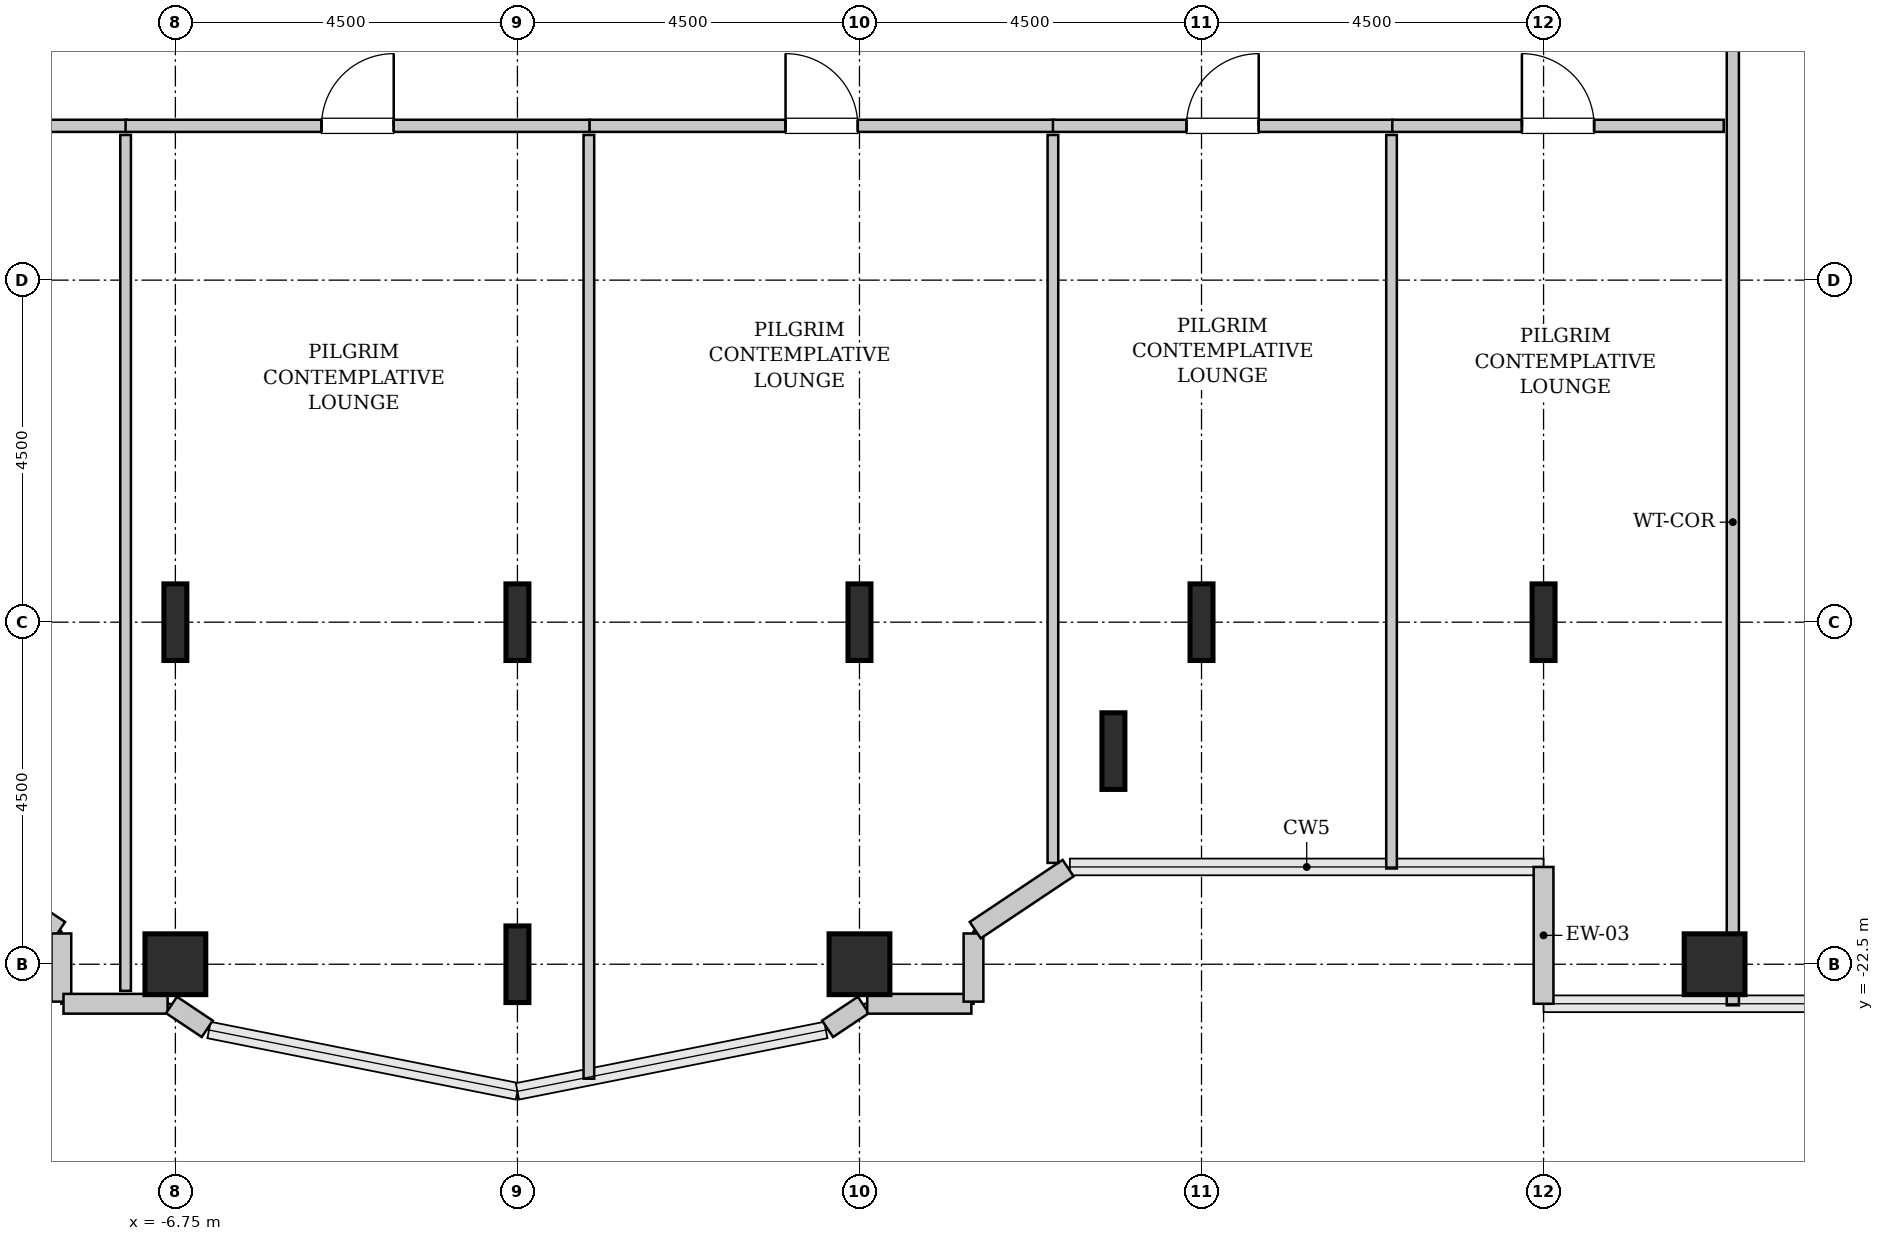
"""IFC4 building model, lengths in metres.
Left out: names, types, materials, properties, quantities, classifications, styles, units other than length and angle.
Written with IfcOpenShell. Run it as: python <this file> out.ifc"""

import sys

from ifc_helpers import new_model, si_unit, direction, frame, frame_2d, origin, origin_2d, place, context, subcontext, project, spatial, rectangle, hollow_rectangle, i_section, extrude, source, transform, mapped, element, fill, save


model = new_model("IFC4")
c1 = context("Model", 3, precision=1e-05, world=origin(), true_north=direction((0.0, 1.0)))
c2 = subcontext(c1, "Body", "Model", "MODEL_VIEW")
j1 = project(units=[si_unit("LENGTHUNIT", "METRE"), si_unit("PLANEANGLEUNIT", "RADIAN")], contexts=[c1])
p1 = place(None, origin())
s1 = spatial("IfcSite", under=j1, at=p1, CompositionType="ELEMENT")
p2 = place(p1, origin())
s2 = spatial("IfcBuilding", under=s1, at=p2, CompositionType="ELEMENT")
p3 = place(p2, frame((0.0, 0.0, 128.8)))
s3 = spatial("IfcBuildingStorey", under=s2, at=p3, CompositionType="ELEMENT", Elevation=128.8)
m1 = source(origin(), c2, "Body", "SweptSolid", [
    extrude(hollow_rectangle(XDim=0.8, YDim=0.8, WallThickness=0.04, InnerFilletRadius=0.04, OuterFilletRadius=0.08, at=origin_2d()), origin(), (0.0, 0.0, 1.0), 3.8),
])
p4 = place(p3, frame((-6.75, -22.5, 0.0), z_axis=(0.0, 0.0, 1.0), x_axis=(1.0, 0.0, 0.0)))
e1 = element("IfcColumn", 1, at=p4, inside=s3, PredefinedType="COLUMN", context=c2, shape_type="MappedRepresentation", body=[
    mapped(m1, transform((0.0, 0.0, 0.0), x_axis=(1.0, 0.0, 0.0), y_axis=(0.0, 1.0, 0.0), z_axis=(0.0, 0.0, 1.0), scale=1.0)),
])
m2 = source(origin(), c2, "Body", "SweptSolid", [
    extrude(i_section(OverallWidth=0.302, OverallDepth=1.008, WebThickness=0.021, FlangeThickness=0.04, FilletRadius=0.03, at=origin_2d()), origin(), (0.0, 0.0, 1.0), 3.8),
])
for number, where, z_axis, x_axis in (
    (2, (-6.75, -18.0, 0.0), (0.0, 0.0, 1.0), (1.0, 0.0, 0.0)),
    (3, (-2.25, -22.5, 0.0), (0.0, 0.0, 1.0), (1.0, 0.0, 0.0)),
    (4, (-2.25, -18.0, 0.0), (0.0, 0.0, 1.0), (1.0, 0.0, 0.0)),
):
    element("IfcColumn", number, at=place(p3, frame(where, z_axis=z_axis, x_axis=x_axis)), inside=s3, PredefinedType="COLUMN", context=c2, shape_type="MappedRepresentation", body=[
        mapped(m2, transform((0.0, 0.0, 0.0), x_axis=(1.0, 0.0, 0.0), y_axis=(0.0, 1.0, 0.0), z_axis=(0.0, 0.0, 1.0), scale=1.0)),
    ])
p5 = place(p3, frame((2.25, -22.5, 0.0), z_axis=(0.0, 0.0, 1.0), x_axis=(1.0, 0.0, 0.0)))
e5 = element("IfcColumn", 5, at=p5, inside=s3, PredefinedType="COLUMN", context=c2, shape_type="MappedRepresentation", body=[
    mapped(m1, transform((0.0, 0.0, 0.0), x_axis=(1.0, 0.0, 0.0), y_axis=(0.0, 1.0, 0.0), z_axis=(0.0, 0.0, 1.0), scale=1.0)),
])
for number, where, z_axis, x_axis in (
    (6, (2.25, -18.0, 0.0), (0.0, 0.0, 1.0), (1.0, 0.0, 0.0)),
    (7, (5.591, -19.696, 0.0), (0.0, 0.0, 1.0), (1.0, 0.0, 0.0)),
    (8, (6.75, -18.0, 0.0), (0.0, 0.0, 1.0), (1.0, 0.0, 0.0)),
    (9, (11.25, -18.0, 0.0), (0.0, 0.0, 1.0), (1.0, 0.0, 0.0)),
):
    element("IfcColumn", number, at=place(p3, frame(where, z_axis=z_axis, x_axis=x_axis)), inside=s3, PredefinedType="COLUMN", context=c2, shape_type="MappedRepresentation", body=[
        mapped(m2, transform((0.0, 0.0, 0.0), x_axis=(1.0, 0.0, 0.0), y_axis=(0.0, 1.0, 0.0), z_axis=(0.0, 0.0, 1.0), scale=1.0)),
    ])
p6 = place(p3, frame((13.5, -22.5, 0.0), z_axis=(0.0, 0.0, 1.0), x_axis=(1.0, 0.0, 0.0)))
e10 = element("IfcColumn", 10, at=p6, inside=s3, PredefinedType="COLUMN", context=c2, shape_type="MappedRepresentation", body=[
    mapped(m1, transform((0.0, 0.0, 0.0), x_axis=(1.0, 0.0, 0.0), y_axis=(0.0, 1.0, 0.0), z_axis=(0.0, 0.0, 1.0), scale=1.0)),
])
m3 = source(origin(), c2, "Body", "SweptSolid", [
    extrude(rectangle(XDim=1.8, YDim=0.26, at=frame_2d((0.9, 0.0))), origin(), (0.0, 0.0, 1.0), 3.55),
])
p7 = place(p3, frame((11.25, -21.22, 0.0), z_axis=(0.0, 0.0, 1.0), x_axis=(0.0, -1.0, 0.0)))
e11 = element("IfcWall", 11, at=p7, inside=s3, PredefinedType="SOLIDWALL", context=c2, shape_type="MappedRepresentation", body=[
    mapped(m3, transform((0.0, 0.0, 0.0), x_axis=(1.0, 0.0, 0.0), y_axis=(0.0, 1.0, 0.0), z_axis=(0.0, 0.0, 1.0), scale=1.0)),
])
m4 = source(origin(), c2, "Body", "SweptSolid", [
    extrude(rectangle(XDim=1.469, YDim=0.26, at=frame_2d((0.734, 0.0))), origin(), (0.0, 0.0, 1.0), 3.55),
])
p8 = place(p3, frame((-9.495, -21.236, 0.0), z_axis=(0.0, 0.0, 1.0), x_axis=(0.831461760506, -0.555581983884, 0.0)))
e12 = element("IfcWall", 12, at=p8, inside=s3, PredefinedType="SOLIDWALL", context=c2, shape_type="MappedRepresentation", body=[
    mapped(m4, transform((0.0, 0.0, 0.0), x_axis=(1.0, 0.0, 0.0), y_axis=(0.0, 1.0, 0.0), z_axis=(0.0, 0.0, 1.0), scale=1.0)),
])
m5 = source(origin(), c2, "Body", "SweptSolid", [
    extrude(rectangle(XDim=0.897, YDim=0.26, at=frame_2d((0.448, 0.0))), origin(), (0.0, 0.0, 1.0), 3.55),
])
p9 = place(p3, frame((-8.25, -22.095, 0.0), z_axis=(0.0, 0.0, 1.0), x_axis=(0.0, -1.0, 0.0)))
e13 = element("IfcWall", 13, at=p9, inside=s3, PredefinedType="SOLIDWALL", context=c2, shape_type="MappedRepresentation", body=[
    mapped(m5, transform((0.0, 0.0, 0.0), x_axis=(1.0, 0.0, 0.0), y_axis=(0.0, 1.0, 0.0), z_axis=(0.0, 0.0, 1.0), scale=1.0)),
])
m6 = source(origin(), c2, "Body", "SweptSolid", [
    extrude(rectangle(XDim=1.37, YDim=0.26, at=frame_2d((0.685, 0.0))), origin(), (0.0, 0.0, 1.0), 3.55),
])
p10 = place(p3, frame((-8.222, -23.02, 0.0), z_axis=(0.0, 0.0, 1.0), x_axis=(1.0, 0.0, 0.0)))
e14 = element("IfcWall", 14, at=p10, inside=s3, PredefinedType="SOLIDWALL", context=c2, shape_type="MappedRepresentation", body=[
    mapped(m6, transform((0.0, 0.0, 0.0), x_axis=(1.0, 0.0, 0.0), y_axis=(0.0, 1.0, 0.0), z_axis=(0.0, 0.0, 1.0), scale=1.0)),
])
m7 = source(origin(), c2, "Body", "SweptSolid", [
    extrude(rectangle(XDim=0.565, YDim=0.26, at=frame_2d((0.283, 0.0))), origin(), (0.0, 0.0, 1.0), 3.55),
])
for number, where, z_axis, x_axis in (
    (15, (-6.801, -23.036, 0.0), (0.0, 0.0, 1.0), (0.832, -0.555, 0.0)),
    (16, (1.831, -23.35, 0.0), (0.0, 0.0, 1.0), (0.832, 0.555, 0.0)),
):
    element("IfcWall", number, at=place(p3, frame(where, z_axis=z_axis, x_axis=x_axis)), inside=s3, PredefinedType="SOLIDWALL", context=c2, shape_type="MappedRepresentation", body=[
        mapped(m7, transform((0.0, 0.0, 0.0), x_axis=(1.0, 0.0, 0.0), y_axis=(0.0, 1.0, 0.0), z_axis=(0.0, 0.0, 1.0), scale=1.0)),
    ])
p11 = place(p3, frame((2.352, -23.02, 0.0), z_axis=(0.0, 0.0, 1.0), x_axis=(1.0, 0.0, 0.0)))
e17 = element("IfcWall", 17, at=p11, inside=s3, PredefinedType="SOLIDWALL", context=c2, shape_type="MappedRepresentation", body=[
    mapped(m6, transform((0.0, 0.0, 0.0), x_axis=(1.0, 0.0, 0.0), y_axis=(0.0, 1.0, 0.0), z_axis=(0.0, 0.0, 1.0), scale=1.0)),
])
p12 = place(p3, frame((3.75, -22.992, 0.0), z_axis=(0.0, 0.0, 1.0), x_axis=(0.0, 1.0, 0.0)))
e18 = element("IfcWall", 18, at=p12, inside=s3, PredefinedType="SOLIDWALL", context=c2, shape_type="MappedRepresentation", body=[
    mapped(m5, transform((0.0, 0.0, 0.0), x_axis=(1.0, 0.0, 0.0), y_axis=(0.0, 1.0, 0.0), z_axis=(0.0, 0.0, 1.0), scale=1.0)),
])
p13 = place(p3, frame((3.773, -22.052, 0.0), z_axis=(0.0, 0.0, 1.0), x_axis=(0.831461760506, 0.555581983884, 0.0)))
e19 = element("IfcWall", 19, at=p13, inside=s3, PredefinedType="SOLIDWALL", context=c2, shape_type="MappedRepresentation", body=[
    mapped(m4, transform((0.0, 0.0, 0.0), x_axis=(1.0, 0.0, 0.0), y_axis=(0.0, 1.0, 0.0), z_axis=(0.0, 0.0, 1.0), scale=1.0)),
])
m8 = source(origin(), c2, "Body", "SweptSolid", [
    extrude(rectangle(XDim=14.745, YDim=0.16, at=frame_2d((7.373, 0.0))), origin(), (0.0, 0.0, 1.0), 3.535),
])
p14 = place(p3, frame((13.74, -23.04, 0.0), z_axis=(0.0, 0.0, 1.0), x_axis=(0.0, 1.0, 0.0)))
e20 = element("IfcWall", 20, at=p14, inside=s3, PredefinedType="PARTITIONING", context=c2, shape_type="MappedRepresentation", body=[
    mapped(m8, transform((0.0, 0.0, 0.0), x_axis=(1.0, 0.0, 0.0), y_axis=(0.0, 1.0, 0.0), z_axis=(0.0, 0.0, 1.0), scale=1.0)),
])
p15 = place(p14, frame((12.663, 0.0, 0.0)))
e21 = element("IfcOpeningElement", 21, at=p15, cuts=e20, PredefinedType="OPENING", context=c2, shape_type="SweptSolid", body=[
    extrude(rectangle(XDim=0.95, YDim=2.1, at=frame_2d((0.475, 1.05))), frame((0.0, 0.09, 0.0), z_axis=(0.0, -1.0, 0.0), x_axis=(1.0, 0.0, 0.0)), (0.0, 0.0, 1.0), 0.18),
])
m9 = source(origin(), c2, "Body", "SweptSolid", [
    extrude(rectangle(XDim=6.225, YDim=0.16, at=frame_2d((3.113, 0.0))), origin(), (0.0, 0.0, 1.0), 3.535),
])
p16 = place(p3, frame((-13.62, -11.47, 0.0), z_axis=(0.0, 0.0, 1.0), x_axis=(1.0, 0.0, 0.0)))
e22 = element("IfcWall", 22, at=p16, inside=s3, PredefinedType="PARTITIONING", context=c2, shape_type="MappedRepresentation", body=[
    mapped(m9, transform((0.0, 0.0, 0.0), x_axis=(1.0, 0.0, 0.0), y_axis=(0.0, 1.0, 0.0), z_axis=(0.0, 0.0, 1.0), scale=1.0)),
])
p17 = place(p16, frame((2.637, 0.0, 0.0)))
e23 = element("IfcOpeningElement", 23, at=p17, cuts=e22, PredefinedType="OPENING", context=c2, shape_type="SweptSolid", body=[
    extrude(rectangle(XDim=0.95, YDim=2.1, at=frame_2d((0.475, 1.05))), frame((0.0, 0.09, 0.0), z_axis=(0.0, -1.0, 0.0), x_axis=(1.0, 0.0, 0.0)), (0.0, 0.0, 1.0), 0.18),
])
m10 = source(origin(), c2, "Body", "SweptSolid", [
    extrude(rectangle(XDim=11.26, YDim=0.14, at=frame_2d((5.63, 0.0))), origin(), (0.0, 0.0, 1.0), 3.535),
])
p18 = place(p3, frame((-7.405, -22.85, 0.0), z_axis=(0.0, 0.0, 1.0), x_axis=(0.0, 1.0, 0.0)))
e24 = element("IfcWall", 24, at=p18, inside=s3, PredefinedType="PARTITIONING", context=c2, shape_type="MappedRepresentation", body=[
    mapped(m10, transform((0.0, 0.0, 0.0), x_axis=(1.0, 0.0, 0.0), y_axis=(0.0, 1.0, 0.0), z_axis=(0.0, 0.0, 1.0), scale=1.0)),
])
m11 = source(origin(), c2, "Body", "SweptSolid", [
    extrude(rectangle(XDim=6.105, YDim=0.16, at=frame_2d((3.052, 0.0))), origin(), (0.0, 0.0, 1.0), 3.535),
])
p19 = place(p3, frame((-7.405, -11.47, 0.0), z_axis=(0.0, 0.0, 1.0), x_axis=(1.0, 0.0, 0.0)))
e25 = element("IfcWall", 25, at=p19, inside=s3, PredefinedType="PARTITIONING", context=c2, shape_type="MappedRepresentation", body=[
    mapped(m11, transform((0.0, 0.0, 0.0), x_axis=(1.0, 0.0, 0.0), y_axis=(0.0, 1.0, 0.0), z_axis=(0.0, 0.0, 1.0), scale=1.0)),
])
p20 = place(p19, frame((2.577, 0.0, 0.0)))
e26 = element("IfcOpeningElement", 26, at=p20, cuts=e25, PredefinedType="OPENING", context=c2, shape_type="SweptSolid", body=[
    extrude(rectangle(XDim=0.95, YDim=2.1, at=frame_2d((0.475, 1.05))), frame((0.0, 0.09, 0.0), z_axis=(0.0, -1.0, 0.0), x_axis=(1.0, 0.0, 0.0)), (0.0, 0.0, 1.0), 0.18),
])
m12 = source(origin(), c2, "Body", "SweptSolid", [
    extrude(rectangle(XDim=12.416, YDim=0.14, at=frame_2d((6.208, 0.0))), origin(), (0.0, 0.0, 1.0), 3.535),
])
p21 = place(p3, frame((-1.31, -24.006, 0.0), z_axis=(0.0, 0.0, 1.0), x_axis=(0.0, 1.0, 0.0)))
e27 = element("IfcWall", 27, at=p21, inside=s3, PredefinedType="PARTITIONING", context=c2, shape_type="MappedRepresentation", body=[
    mapped(m12, transform((0.0, 0.0, 0.0), x_axis=(1.0, 0.0, 0.0), y_axis=(0.0, 1.0, 0.0), z_axis=(0.0, 0.0, 1.0), scale=1.0)),
])
p22 = place(p3, frame((-1.3, -11.47, 0.0), z_axis=(0.0, 0.0, 1.0), x_axis=(1.0, 0.0, 0.0)))
e28 = element("IfcWall", 28, at=p22, inside=s3, PredefinedType="PARTITIONING", context=c2, shape_type="MappedRepresentation", body=[
    mapped(m11, transform((0.0, 0.0, 0.0), x_axis=(1.0, 0.0, 0.0), y_axis=(0.0, 1.0, 0.0), z_axis=(0.0, 0.0, 1.0), scale=1.0)),
])
p23 = place(p22, frame((2.577, 0.0, 0.0)))
e29 = element("IfcOpeningElement", 29, at=p23, cuts=e28, PredefinedType="OPENING", context=c2, shape_type="SweptSolid", body=[
    extrude(rectangle(XDim=0.95, YDim=2.1, at=frame_2d((0.475, 1.05))), frame((0.0, 0.09, 0.0), z_axis=(0.0, -1.0, 0.0), x_axis=(1.0, 0.0, 0.0)), (0.0, 0.0, 1.0), 0.18),
])
m13 = source(origin(), c2, "Body", "SweptSolid", [
    extrude(rectangle(XDim=9.577, YDim=0.14, at=frame_2d((4.789, 0.0))), origin(), (0.0, 0.0, 1.0), 3.535),
])
p24 = place(p3, frame((4.795, -21.167, 0.0), z_axis=(0.0, 0.0, 1.0), x_axis=(0.0, 1.0, 0.0)))
e30 = element("IfcWall", 30, at=p24, inside=s3, PredefinedType="PARTITIONING", context=c2, shape_type="MappedRepresentation", body=[
    mapped(m13, transform((0.0, 0.0, 0.0), x_axis=(1.0, 0.0, 0.0), y_axis=(0.0, 1.0, 0.0), z_axis=(0.0, 0.0, 1.0), scale=1.0)),
])
m14 = source(origin(), c2, "Body", "SweptSolid", [
    extrude(rectangle(XDim=4.465, YDim=0.16, at=frame_2d((2.232, 0.0))), origin(), (0.0, 0.0, 1.0), 3.535),
])
p25 = place(p3, frame((4.795, -11.47, 0.0), z_axis=(0.0, 0.0, 1.0), x_axis=(1.0, 0.0, 0.0)))
e31 = element("IfcWall", 31, at=p25, inside=s3, PredefinedType="PARTITIONING", context=c2, shape_type="MappedRepresentation", body=[
    mapped(m14, transform((0.0, 0.0, 0.0), x_axis=(1.0, 0.0, 0.0), y_axis=(0.0, 1.0, 0.0), z_axis=(0.0, 0.0, 1.0), scale=1.0)),
])
p26 = place(p25, frame((1.758, 0.0, 0.0)))
e32 = element("IfcOpeningElement", 32, at=p26, cuts=e31, PredefinedType="OPENING", context=c2, shape_type="SweptSolid", body=[
    extrude(rectangle(XDim=0.95, YDim=2.1, at=frame_2d((0.475, 1.05))), frame((0.0, 0.09, 0.0), z_axis=(0.0, -1.0, 0.0), x_axis=(1.0, 0.0, 0.0)), (0.0, 0.0, 1.0), 0.18),
])
m15 = source(origin(), c2, "Body", "SweptSolid", [
    extrude(rectangle(XDim=9.65, YDim=0.14, at=frame_2d((4.825, 0.0))), origin(), (0.0, 0.0, 1.0), 3.535),
])
p27 = place(p3, frame((9.25, -21.24, 0.0), z_axis=(0.0, 0.0, 1.0), x_axis=(0.0, 1.0, 0.0)))
e33 = element("IfcWall", 33, at=p27, inside=s3, PredefinedType="PARTITIONING", context=c2, shape_type="MappedRepresentation", body=[
    mapped(m15, transform((0.0, 0.0, 0.0), x_axis=(1.0, 0.0, 0.0), y_axis=(0.0, 1.0, 0.0), z_axis=(0.0, 0.0, 1.0), scale=1.0)),
])
m16 = source(origin(), c2, "Body", "SweptSolid", [
    extrude(rectangle(XDim=4.36, YDim=0.16, at=frame_2d((2.18, 0.0))), origin(), (0.0, 0.0, 1.0), 3.535),
])
p28 = place(p3, frame((9.26, -11.47, 0.0), z_axis=(0.0, 0.0, 1.0), x_axis=(1.0, 0.0, 0.0)))
e34 = element("IfcWall", 34, at=p28, inside=s3, PredefinedType="PARTITIONING", context=c2, shape_type="MappedRepresentation", body=[
    mapped(m16, transform((0.0, 0.0, 0.0), x_axis=(1.0, 0.0, 0.0), y_axis=(0.0, 1.0, 0.0), z_axis=(0.0, 0.0, 1.0), scale=1.0)),
])
p29 = place(p28, frame((1.705, 0.0, 0.0)))
e35 = element("IfcOpeningElement", 35, at=p29, cuts=e34, PredefinedType="OPENING", context=c2, shape_type="SweptSolid", body=[
    extrude(rectangle(XDim=0.95, YDim=2.1, at=frame_2d((0.475, 1.05))), frame((0.0, 0.09, 0.0), z_axis=(0.0, -1.0, 0.0), x_axis=(1.0, 0.0, 0.0)), (0.0, 0.0, 1.0), 0.18),
])
m17 = source(origin(), c2, "Body", "SweptSolid", [
    extrude(rectangle(XDim=0.95, YDim=2.1, at=frame_2d((0.475, 1.05))), frame((0.0, 0.025, 0.0), z_axis=(0.0, -1.0, 0.0), x_axis=(1.0, 0.0, 0.0)), (0.0, 0.0, 1.0), 0.05),
])
p30 = place(p20, origin())
e36 = element("IfcDoor", 36, at=p30, inside=s3, OperationType="SINGLE_SWING_RIGHT", PredefinedType="DOOR", context=c2, shape_type="MappedRepresentation", body=[
    mapped(m17, transform((0.0, 0.0, 0.0), x_axis=(1.0, 0.0, 0.0), y_axis=(0.0, 1.0, 0.0), z_axis=(0.0, 0.0, 1.0), scale=1.0)),
])
fill(e26, e36)
p31 = place(p23, origin())
e37 = element("IfcDoor", 37, at=p31, inside=s3, OperationType="SINGLE_SWING_LEFT", PredefinedType="DOOR", context=c2, shape_type="MappedRepresentation", body=[
    mapped(m17, transform((0.0, 0.0, 0.0), x_axis=(1.0, 0.0, 0.0), y_axis=(0.0, 1.0, 0.0), z_axis=(0.0, 0.0, 1.0), scale=1.0)),
])
fill(e29, e37)
p32 = place(p26, origin())
e38 = element("IfcDoor", 38, at=p32, inside=s3, OperationType="SINGLE_SWING_RIGHT", PredefinedType="DOOR", context=c2, shape_type="MappedRepresentation", body=[
    mapped(m17, transform((0.0, 0.0, 0.0), x_axis=(1.0, 0.0, 0.0), y_axis=(0.0, 1.0, 0.0), z_axis=(0.0, 0.0, 1.0), scale=1.0)),
])
fill(e32, e38)
p33 = place(p29, origin())
e39 = element("IfcDoor", 39, at=p33, inside=s3, OperationType="SINGLE_SWING_LEFT", PredefinedType="DOOR", context=c2, shape_type="MappedRepresentation", body=[
    mapped(m17, transform((0.0, 0.0, 0.0), x_axis=(1.0, 0.0, 0.0), y_axis=(0.0, 1.0, 0.0), z_axis=(0.0, 0.0, 1.0), scale=1.0)),
])
fill(e35, e39)
save(model, sys.argv[1])
